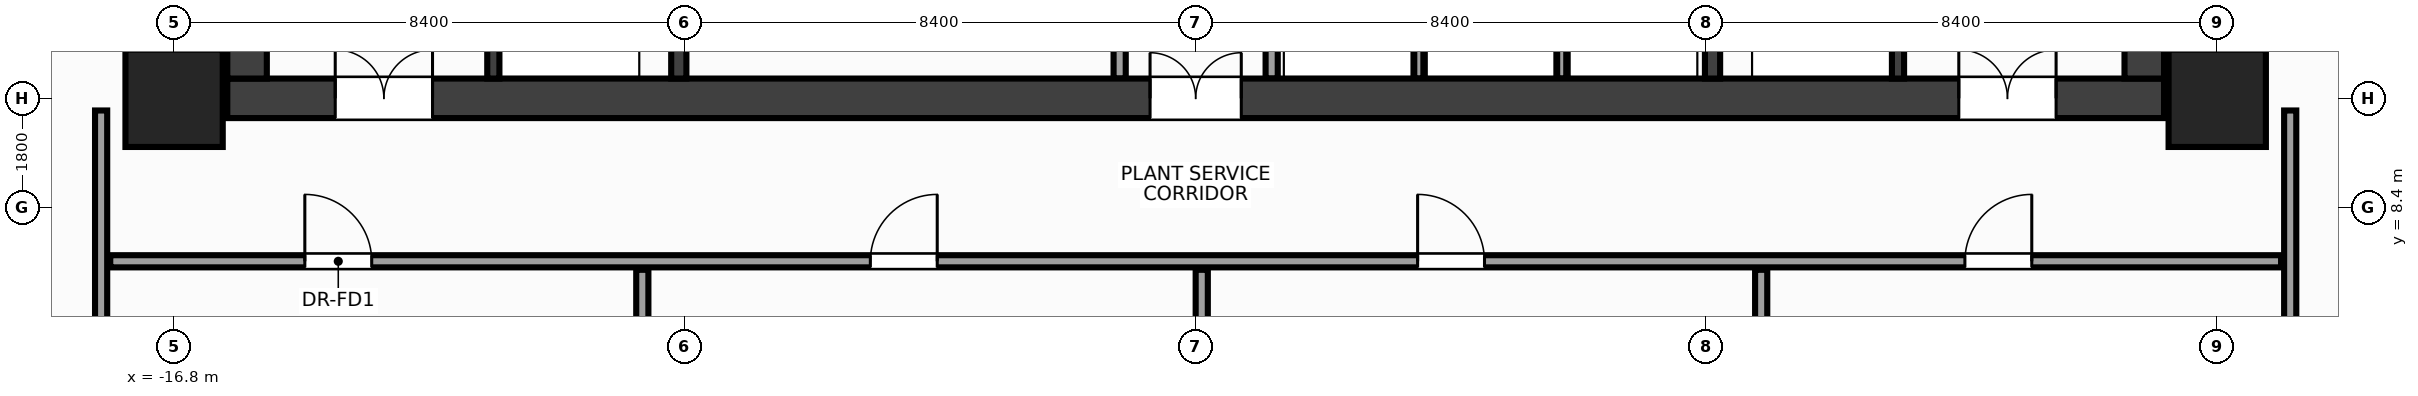
"""IFC4 building model, lengths in metres.
Left out: names, types, materials, properties, quantities, classifications, styles, units other than length and angle.
Written with IfcOpenShell. Run it as: python <this file> out.ifc"""

import sys

from ifc_helpers import new_model, si_unit, direction, frame, frame_2d, origin, origin_2d, place, context, subcontext, project, spatial, rectangle, extrude, source, transform, mapped, element, fill, save


model = new_model("IFC4")
c1 = context("Model", 3, precision=1e-05, world=origin(), true_north=direction((0.0, 1.0)))
c2 = subcontext(c1, "Body", "Model", "MODEL_VIEW")
j1 = project(units=[si_unit("LENGTHUNIT", "METRE"), si_unit("PLANEANGLEUNIT", "RADIAN")], contexts=[c1])
p1 = place(None, origin())
s1 = spatial("IfcSite", under=j1, at=p1, CompositionType="ELEMENT")
p2 = place(p1, origin())
s2 = spatial("IfcBuilding", under=s1, at=p2, CompositionType="ELEMENT")
p3 = place(p2, frame((0.0, 0.0, 189.2)))
s3 = spatial("IfcBuildingStorey", under=s2, at=p3, CompositionType="ELEMENT", Elevation=189.2)
m1 = source(origin(), c2, "Body", "SweptSolid", [
    extrude(rectangle(XDim=31.85, YDim=0.65, at=frame_2d((15.925, 0.0))), origin(), (0.0, 0.0, 1.0), 7.2),
])
p4 = place(p3, frame((-15.925, 10.2, 0.0), z_axis=(0.0, 0.0, 1.0), x_axis=(1.0, 0.0, 0.0)))
e1 = element("IfcWall", 1, at=p4, inside=s3, PredefinedType="SHEAR", context=c2, shape_type="MappedRepresentation", body=[
    mapped(m1, transform((0.0, 0.0, 0.0), x_axis=(1.0, 0.0, 0.0), y_axis=(0.0, 1.0, 0.0), z_axis=(0.0, 0.0, 1.0), scale=1.0)),
])
p5 = place(p4, frame((1.775, 0.0, 0.0)))
e2 = element("IfcOpeningElement", 2, at=p5, cuts=e1, PredefinedType="OPENING", context=c2, shape_type="SweptSolid", body=[
    extrude(rectangle(XDim=1.6, YDim=2.15, at=frame_2d((0.8, 1.075))), frame((0.0, 0.337, 0.0), z_axis=(0.0, -1.0, 0.0), x_axis=(1.0, 0.0, 0.0)), (0.0, 0.0, 1.0), 0.674),
])
p6 = place(p4, frame((28.475, 0.0, 0.0)))
e3 = element("IfcOpeningElement", 3, at=p6, cuts=e1, PredefinedType="OPENING", context=c2, shape_type="SweptSolid", body=[
    extrude(rectangle(XDim=1.6, YDim=2.15, at=frame_2d((0.8, 1.075))), frame((0.0, 0.337, 0.0), z_axis=(0.0, -1.0, 0.0), x_axis=(1.0, 0.0, 0.0)), (0.0, 0.0, 1.0), 0.674),
])
p7 = place(p4, frame((15.175, 0.0, 0.0)))
e4 = element("IfcOpeningElement", 4, at=p7, cuts=e1, PredefinedType="OPENING", context=c2, shape_type="SweptSolid", body=[
    extrude(rectangle(XDim=1.5, YDim=2.2, at=frame_2d((0.75, 1.1))), frame((0.0, 0.337, 0.0), z_axis=(0.0, -1.0, 0.0), x_axis=(1.0, 0.0, 0.0)), (0.0, 0.0, 1.0), 0.674),
])
m2 = source(origin(), c2, "Body", "SweptSolid", [
    extrude(rectangle(XDim=12.95, YDim=0.65, at=frame_2d((6.475, 0.0))), origin(), (0.0, 0.0, 1.0), 7.2),
])
for number, where, z_axis, x_axis in (
    (5, (-15.6, 10.525, 0.0), (0.0, 0.0, 1.0), (0.0, 1.0, 0.0)),
    (6, (15.6, 10.525, 0.0), (0.0, 0.0, 1.0), (0.0, 1.0, 0.0)),
):
    element("IfcWall", number, at=place(p3, frame(where, z_axis=z_axis, x_axis=x_axis)), inside=s3, PredefinedType="SHEAR", context=c2, shape_type="MappedRepresentation", body=[
        mapped(m2, transform((0.0, 0.0, 0.0), x_axis=(1.0, 0.0, 0.0), y_axis=(0.0, 1.0, 0.0), z_axis=(0.0, 0.0, 1.0), scale=1.0)),
    ])
m3 = source(origin(), c2, "Body", "SweptSolid", [
    extrude(rectangle(XDim=12.95, YDim=0.25, at=frame_2d((6.475, 0.0))), origin(), (0.0, 0.0, 1.0), 7.2),
])
p8 = place(p3, frame((-8.5, 10.525, 0.0), z_axis=(0.0, 0.0, 1.0), x_axis=(0.0, 1.0, 0.0)))
e7 = element("IfcWall", 7, at=p8, inside=s3, PredefinedType="SHEAR", context=c2, shape_type="MappedRepresentation", body=[
    mapped(m3, transform((0.0, 0.0, 0.0), x_axis=(1.0, 0.0, 0.0), y_axis=(0.0, 1.0, 0.0), z_axis=(0.0, 0.0, 1.0), scale=1.0)),
])
p9 = place(p3, frame((8.5, 10.525, 0.0), z_axis=(0.0, 0.0, 1.0), x_axis=(0.0, 1.0, 0.0)))
e8 = element("IfcWall", 8, at=p9, inside=s3, PredefinedType="SHEAR", context=c2, shape_type="MappedRepresentation", body=[
    mapped(m3, transform((0.0, 0.0, 0.0), x_axis=(1.0, 0.0, 0.0), y_axis=(0.0, 1.0, 0.0), z_axis=(0.0, 0.0, 1.0), scale=1.0)),
])
p10 = place(p9, frame((9.925, 0.0, 0.0)))
e9 = element("IfcOpeningElement", 9, at=p10, cuts=e8, PredefinedType="OPENING", context=c2, shape_type="SweptSolid", body=[
    extrude(rectangle(XDim=0.95, YDim=2.15, at=frame_2d((0.475, 1.075))), frame((0.0, 0.137, 0.0), z_axis=(0.0, -1.0, 0.0), x_axis=(1.0, 0.0, 0.0)), (0.0, 0.0, 1.0), 0.274),
])
m4 = source(origin(), c2, "Body", "SweptSolid", [
    extrude(rectangle(XDim=3.125, YDim=0.2, at=frame_2d((1.562, 0.0))), origin(), (0.0, 0.0, 1.0), 7.2),
])
p11 = place(p3, frame((-11.55, 10.525, 0.0), z_axis=(0.0, 0.0, 1.0), x_axis=(0.0, 1.0, 0.0)))
e10 = element("IfcWall", 10, at=p11, inside=s3, PredefinedType="SHEAR", context=c2, shape_type="MappedRepresentation", body=[
    mapped(m4, transform((0.0, 0.0, 0.0), x_axis=(1.0, 0.0, 0.0), y_axis=(0.0, 1.0, 0.0), z_axis=(0.0, 0.0, 1.0), scale=1.0)),
])
p12 = place(p11, frame((0.9, 0.0, 0.0)))
e11 = element("IfcOpeningElement", 11, at=p12, cuts=e10, PredefinedType="OPENING", context=c2, shape_type="SweptSolid", body=[
    extrude(rectangle(XDim=1.1, YDim=2.15, at=frame_2d((0.55, 1.075))), frame((0.0, 0.112, 0.0), z_axis=(0.0, -1.0, 0.0), x_axis=(1.0, 0.0, 0.0)), (0.0, 0.0, 1.0), 0.224),
])
p13 = place(p3, frame((11.55, 10.525, 0.0), z_axis=(0.0, 0.0, 1.0), x_axis=(0.0, 1.0, 0.0)))
e12 = element("IfcWall", 12, at=p13, inside=s3, PredefinedType="SHEAR", context=c2, shape_type="MappedRepresentation", body=[
    mapped(m4, transform((0.0, 0.0, 0.0), x_axis=(1.0, 0.0, 0.0), y_axis=(0.0, 1.0, 0.0), z_axis=(0.0, 0.0, 1.0), scale=1.0)),
])
p14 = place(p13, frame((0.9, 0.0, 0.0)))
e13 = element("IfcOpeningElement", 13, at=p14, cuts=e12, PredefinedType="OPENING", context=c2, shape_type="SweptSolid", body=[
    extrude(rectangle(XDim=1.1, YDim=2.15, at=frame_2d((0.55, 1.075))), frame((0.0, 0.112, 0.0), z_axis=(0.0, -1.0, 0.0), x_axis=(1.0, 0.0, 0.0)), (0.0, 0.0, 1.0), 0.224),
])
m5 = source(origin(), c2, "Body", "SweptSolid", [
    extrude(rectangle(XDim=1.6, YDim=1.6, at=origin_2d()), origin(), (0.0, 0.0, 1.0), 7.2),
])
for number, where, z_axis, x_axis in (
    (14, (-16.8, 10.2, 0.0), (0.0, 0.0, 1.0), (1.0, 0.0, 0.0)),
    (15, (16.8, 10.2, 0.0), (0.0, 0.0, 1.0), (1.0, 0.0, 0.0)),
):
    element("IfcColumn", number, at=place(p3, frame(where, z_axis=z_axis, x_axis=x_axis)), inside=s3, PredefinedType="COLUMN", context=c2, shape_type="MappedRepresentation", body=[
        mapped(m5, transform((0.0, 0.0, 0.0), x_axis=(1.0, 0.0, 0.0), y_axis=(0.0, 1.0, 0.0), z_axis=(0.0, 0.0, 1.0), scale=1.0)),
    ])
m6 = source(origin(), c2, "Body", "SweptSolid", [
    extrude(rectangle(XDim=3.415, YDim=0.2, at=frame_2d((1.708, 0.0))), origin(), (0.0, 0.0, 1.0), 6.9),
])
for number, where, z_axis, x_axis in (
    (16, (-1.25, 10.525, 0.0), (0.0, 0.0, 1.0), (0.0, 1.0, 0.0)),
    (17, (1.25, 10.525, 0.0), (0.0, 0.0, 1.0), (0.0, 1.0, 0.0)),
):
    element("IfcWall", number, at=place(p3, frame(where, z_axis=z_axis, x_axis=x_axis)), inside=s3, PredefinedType="PARTITIONING", context=c2, shape_type="MappedRepresentation", body=[
        mapped(m6, transform((0.0, 0.0, 0.0), x_axis=(1.0, 0.0, 0.0), y_axis=(0.0, 1.0, 0.0), z_axis=(0.0, 0.0, 1.0), scale=1.0)),
    ])
m7 = source(origin(), c2, "Body", "SweptSolid", [
    extrude(rectangle(XDim=3.415, YDim=0.15, at=frame_2d((1.708, 0.0))), origin(), (0.0, 0.0, 1.0), 6.9),
])
for number, where, z_axis, x_axis in (
    (18, (3.67, 10.525, 0.0), (0.0, 0.0, 1.0), (0.0, 1.0, 0.0)),
    (19, (6.02, 10.525, 0.0), (0.0, 0.0, 1.0), (0.0, 1.0, 0.0)),
):
    element("IfcWall", number, at=place(p3, frame(where, z_axis=z_axis, x_axis=x_axis)), inside=s3, PredefinedType="PARTITIONING", context=c2, shape_type="MappedRepresentation", body=[
        mapped(m7, transform((0.0, 0.0, 0.0), x_axis=(1.0, 0.0, 0.0), y_axis=(0.0, 1.0, 0.0), z_axis=(0.0, 0.0, 1.0), scale=1.0)),
    ])
m8 = source(origin(), c2, "Body", "SweptSolid", [
    extrude(rectangle(XDim=22.85, YDim=0.2, at=frame_2d((11.425, 0.0))), origin(), (0.0, 0.0, 1.0), 6.435),
])
for number, where, z_axis, x_axis in (
    (20, (-18.0, -12.85, 0.0), (0.0, 0.0, 1.0), (0.0, 1.0, 0.0)),
    (21, (18.0, -12.85, 0.0), (0.0, 0.0, 1.0), (0.0, 1.0, 0.0)),
):
    element("IfcWall", number, at=place(p3, frame(where, z_axis=z_axis, x_axis=x_axis)), inside=s3, PredefinedType="PARTITIONING", context=c2, shape_type="MappedRepresentation", body=[
        mapped(m8, transform((0.0, 0.0, 0.0), x_axis=(1.0, 0.0, 0.0), y_axis=(0.0, 1.0, 0.0), z_axis=(0.0, 0.0, 1.0), scale=1.0)),
    ])
m9 = source(origin(), c2, "Body", "SweptSolid", [
    extrude(rectangle(XDim=35.7, YDim=0.2, at=frame_2d((17.85, 0.0))), origin(), (0.0, 0.0, 1.0), 6.285),
])
p15 = place(p3, frame((-17.85, 7.52, 0.0), z_axis=(0.0, 0.0, 1.0), x_axis=(1.0, 0.0, 0.0)))
e22 = element("IfcWall", 22, at=p15, inside=s3, PredefinedType="PARTITIONING", context=c2, shape_type="MappedRepresentation", body=[
    mapped(m9, transform((0.0, 0.0, 0.0), x_axis=(1.0, 0.0, 0.0), y_axis=(0.0, 1.0, 0.0), z_axis=(0.0, 0.0, 1.0), scale=1.0)),
])
p16 = place(p15, frame((3.2, 0.0, 0.0)))
e23 = element("IfcOpeningElement", 23, at=p16, cuts=e22, PredefinedType="OPENING", context=c2, shape_type="SweptSolid", body=[
    extrude(rectangle(XDim=1.1, YDim=2.15, at=frame_2d((0.55, 1.075))), frame((0.0, 0.112, 0.0), z_axis=(0.0, -1.0, 0.0), x_axis=(1.0, 0.0, 0.0)), (0.0, 0.0, 1.0), 0.224),
])
p17 = place(p15, frame((12.5, 0.0, 0.0)))
e24 = element("IfcOpeningElement", 24, at=p17, cuts=e22, PredefinedType="OPENING", context=c2, shape_type="SweptSolid", body=[
    extrude(rectangle(XDim=1.1, YDim=2.15, at=frame_2d((0.55, 1.075))), frame((0.0, 0.112, 0.0), z_axis=(0.0, -1.0, 0.0), x_axis=(1.0, 0.0, 0.0)), (0.0, 0.0, 1.0), 0.224),
])
p18 = place(p15, frame((21.5, 0.0, 0.0)))
e25 = element("IfcOpeningElement", 25, at=p18, cuts=e22, PredefinedType="OPENING", context=c2, shape_type="SweptSolid", body=[
    extrude(rectangle(XDim=1.1, YDim=2.15, at=frame_2d((0.55, 1.075))), frame((0.0, 0.112, 0.0), z_axis=(0.0, -1.0, 0.0), x_axis=(1.0, 0.0, 0.0)), (0.0, 0.0, 1.0), 0.224),
])
p19 = place(p15, frame((30.5, 0.0, 0.0)))
e26 = element("IfcOpeningElement", 26, at=p19, cuts=e22, PredefinedType="OPENING", context=c2, shape_type="SweptSolid", body=[
    extrude(rectangle(XDim=1.1, YDim=2.15, at=frame_2d((0.55, 1.075))), frame((0.0, 0.112, 0.0), z_axis=(0.0, -1.0, 0.0), x_axis=(1.0, 0.0, 0.0)), (0.0, 0.0, 1.0), 0.224),
])
m10 = source(origin(), c2, "Body", "SweptSolid", [
    extrude(rectangle(XDim=20.23, YDim=0.2, at=frame_2d((10.115, 0.0))), origin(), (0.0, 0.0, 1.0), 6.435),
])
p20 = place(p3, frame((-9.1, -12.85, 0.0), z_axis=(0.0, 0.0, 1.0), x_axis=(0.0, 1.0, 0.0)))
e27 = element("IfcWall", 27, at=p20, inside=s3, PredefinedType="PARTITIONING", context=c2, shape_type="MappedRepresentation", body=[
    mapped(m10, transform((0.0, 0.0, 0.0), x_axis=(1.0, 0.0, 0.0), y_axis=(0.0, 1.0, 0.0), z_axis=(0.0, 0.0, 1.0), scale=1.0)),
])
m11 = source(origin(), c2, "Body", "SweptSolid", [
    extrude(rectangle(XDim=20.23, YDim=0.2, at=frame_2d((10.115, 0.0))), origin(), (0.0, 0.0, 1.0), 6.225),
])
p21 = place(p3, frame((0.1, -12.85, 0.0), z_axis=(0.0, 0.0, 1.0), x_axis=(0.0, 1.0, 0.0)))
e28 = element("IfcWall", 28, at=p21, inside=s3, PredefinedType="PARTITIONING", context=c2, shape_type="MappedRepresentation", body=[
    mapped(m11, transform((0.0, 0.0, 0.0), x_axis=(1.0, 0.0, 0.0), y_axis=(0.0, 1.0, 0.0), z_axis=(0.0, 0.0, 1.0), scale=1.0)),
])
p22 = place(p3, frame((9.3, -12.85, 0.0), z_axis=(0.0, 0.0, 1.0), x_axis=(0.0, 1.0, 0.0)))
e29 = element("IfcWall", 29, at=p22, inside=s3, PredefinedType="PARTITIONING", context=c2, shape_type="MappedRepresentation", body=[
    mapped(m10, transform((0.0, 0.0, 0.0), x_axis=(1.0, 0.0, 0.0), y_axis=(0.0, 1.0, 0.0), z_axis=(0.0, 0.0, 1.0), scale=1.0)),
])
p23 = place(p22, frame((5.2, 0.0, 0.0)))
e30 = element("IfcOpeningElement", 30, at=p23, cuts=e29, PredefinedType="OPENING", context=c2, shape_type="SweptSolid", body=[
    extrude(rectangle(XDim=1.1, YDim=2.15, at=frame_2d((0.55, 1.075))), frame((0.0, 0.112, 0.0), z_axis=(0.0, -1.0, 0.0), x_axis=(1.0, 0.0, 0.0)), (0.0, 0.0, 1.0), 0.224),
])
m12 = source(origin(), c2, "Body", "SweptSolid", [
    extrude(rectangle(XDim=1.6, YDim=2.15, at=frame_2d((0.8, 1.075))), frame((0.0, 0.025, 0.0), z_axis=(0.0, -1.0, 0.0), x_axis=(1.0, 0.0, 0.0)), (0.0, 0.0, 1.0), 0.05),
])
p24 = place(p5, origin())
e31 = element("IfcDoor", 31, at=p24, inside=s3, OperationType="DOUBLE_DOOR_SINGLE_SWING", PredefinedType="DOOR", context=c2, shape_type="MappedRepresentation", body=[
    mapped(m12, transform((0.0, 0.0, 0.0), x_axis=(1.0, 0.0, 0.0), y_axis=(0.0, 1.0, 0.0), z_axis=(0.0, 0.0, 1.0), scale=1.0)),
])
fill(e2, e31)
p25 = place(p6, origin())
e32 = element("IfcDoor", 32, at=p25, inside=s3, OperationType="DOUBLE_DOOR_SINGLE_SWING", PredefinedType="DOOR", context=c2, shape_type="MappedRepresentation", body=[
    mapped(m12, transform((0.0, 0.0, 0.0), x_axis=(1.0, 0.0, 0.0), y_axis=(0.0, 1.0, 0.0), z_axis=(0.0, 0.0, 1.0), scale=1.0)),
])
fill(e3, e32)
m13 = source(origin(), c2, "Body", "SweptSolid", [
    extrude(rectangle(XDim=1.5, YDim=2.2, at=frame_2d((0.75, 1.1))), frame((0.0, 0.025, 0.0), z_axis=(0.0, -1.0, 0.0), x_axis=(1.0, 0.0, 0.0)), (0.0, 0.0, 1.0), 0.05),
])
p26 = place(p7, origin())
e33 = element("IfcDoor", 33, at=p26, inside=s3, OperationType="DOUBLE_DOOR_SINGLE_SWING", PredefinedType="DOOR", context=c2, shape_type="MappedRepresentation", body=[
    mapped(m13, transform((0.0, 0.0, 0.0), x_axis=(1.0, 0.0, 0.0), y_axis=(0.0, 1.0, 0.0), z_axis=(0.0, 0.0, 1.0), scale=1.0)),
])
fill(e4, e33)
m14 = source(origin(), c2, "Body", "SweptSolid", [
    extrude(rectangle(XDim=1.1, YDim=2.15, at=frame_2d((0.55, 1.075))), frame((0.0, 0.025, 0.0), z_axis=(0.0, -1.0, 0.0), x_axis=(1.0, 0.0, 0.0)), (0.0, 0.0, 1.0), 0.05),
])
p27 = place(p16, origin())
e34 = element("IfcDoor", 34, at=p27, inside=s3, OperationType="SINGLE_SWING_LEFT", PredefinedType="DOOR", context=c2, shape_type="MappedRepresentation", body=[
    mapped(m14, transform((0.0, 0.0, 0.0), x_axis=(1.0, 0.0, 0.0), y_axis=(0.0, 1.0, 0.0), z_axis=(0.0, 0.0, 1.0), scale=1.0)),
])
fill(e23, e34)
p28 = place(p17, origin())
e35 = element("IfcDoor", 35, at=p28, inside=s3, OperationType="SINGLE_SWING_RIGHT", PredefinedType="DOOR", context=c2, shape_type="MappedRepresentation", body=[
    mapped(m14, transform((0.0, 0.0, 0.0), x_axis=(1.0, 0.0, 0.0), y_axis=(0.0, 1.0, 0.0), z_axis=(0.0, 0.0, 1.0), scale=1.0)),
])
fill(e24, e35)
p29 = place(p18, origin())
e36 = element("IfcDoor", 36, at=p29, inside=s3, OperationType="SINGLE_SWING_LEFT", PredefinedType="DOOR", context=c2, shape_type="MappedRepresentation", body=[
    mapped(m14, transform((0.0, 0.0, 0.0), x_axis=(1.0, 0.0, 0.0), y_axis=(0.0, 1.0, 0.0), z_axis=(0.0, 0.0, 1.0), scale=1.0)),
])
fill(e25, e36)
p30 = place(p19, origin())
e37 = element("IfcDoor", 37, at=p30, inside=s3, OperationType="SINGLE_SWING_RIGHT", PredefinedType="DOOR", context=c2, shape_type="MappedRepresentation", body=[
    mapped(m14, transform((0.0, 0.0, 0.0), x_axis=(1.0, 0.0, 0.0), y_axis=(0.0, 1.0, 0.0), z_axis=(0.0, 0.0, 1.0), scale=1.0)),
])
fill(e26, e37)
save(model, sys.argv[1])
